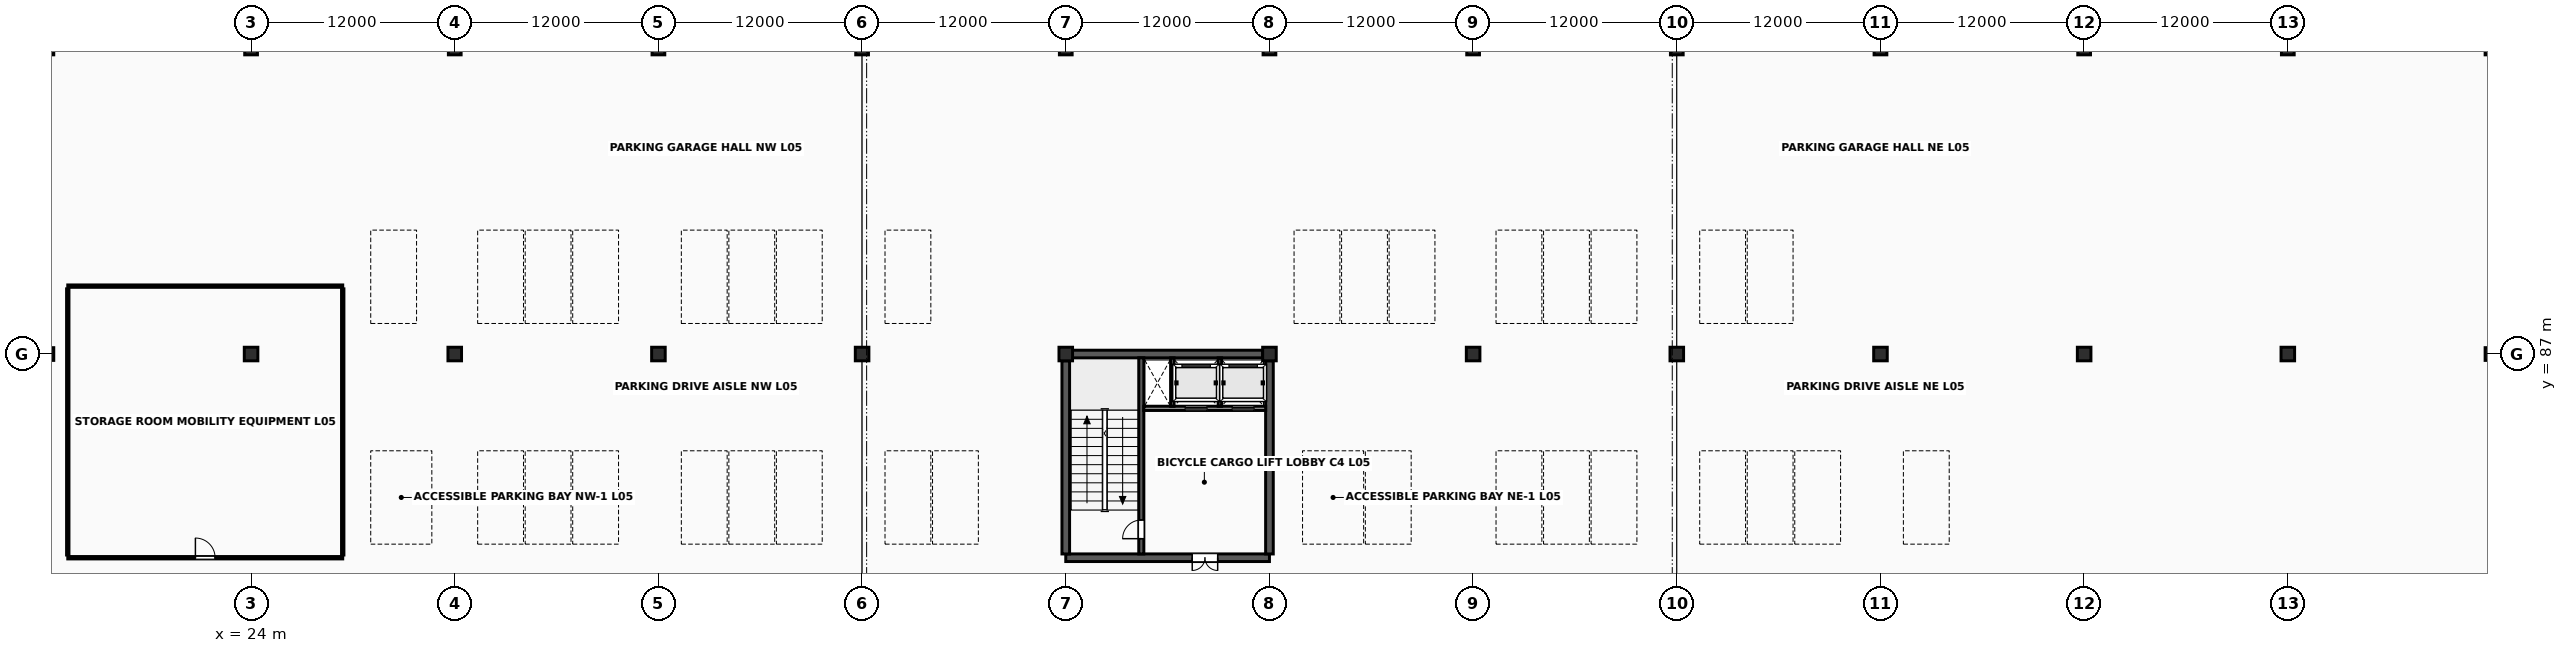
"""IFC4 building model, lengths in metres.
Left out: names, types, materials, properties, quantities, classifications, styles, units other than length and angle.
Written with IfcOpenShell. Run it as: python <this file> out.ifc"""

import sys

from ifc_helpers import new_model, si_unit, direction, frame, frame_2d, origin, origin_2d, place, context, subcontext, project, spatial, rectangle, extrude, element, fill, save


model = new_model("IFC4")
c1 = context("Model", 3, precision=1e-05, world=origin(), true_north=direction((0.0, 1.0)))
c2 = subcontext(c1, "Body", "Model", "MODEL_VIEW")
j1 = project(units=[si_unit("LENGTHUNIT", "METRE"), si_unit("PLANEANGLEUNIT", "RADIAN")], contexts=[c1])
p1 = place(None, origin())
s1 = spatial("IfcSite", under=j1, at=p1, CompositionType="ELEMENT")
p2 = place(p1, origin())
s2 = spatial("IfcBuilding", under=s1, at=p2, CompositionType="ELEMENT")
p3 = place(p2, frame((0.0, 0.0, 21.0)))
s3 = spatial("IfcBuildingStorey", under=s2, at=p3, CompositionType="ELEMENT", Elevation=21.0)
for number, where, z_axis, x_axis in (
    (1, (12.0, 87.0, 0.0), (0.0, 0.0, 1.0), (1.0, 0.0, 0.0)),
    (2, (12.0, 105.0, 0.0), (0.0, 0.0, 1.0), (1.0, 0.0, 0.0)),
):
    element("IfcColumn", number, at=place(p3, frame(where, z_axis=z_axis, x_axis=x_axis)), inside=s3, PredefinedType="COLUMN", context=c2, shape_type="SweptSolid", body=[
        extrude(rectangle(XDim=0.75, YDim=0.75, at=origin_2d()), origin(), (0.0, 0.0, 1.0), 3.8),
    ])
p4 = place(p3, frame((24.0, 87.0, 0.0), z_axis=(0.0, 0.0, 1.0), x_axis=(1.0, 0.0, 0.0)))
e3 = element("IfcColumn", 3, at=p4, inside=s3, PredefinedType="COLUMN", context=c2, shape_type="SweptSolid", body=[
    extrude(rectangle(XDim=0.8, YDim=0.8, at=origin_2d()), origin(), (0.0, 0.0, 1.0), 3.8),
])
p5 = place(p3, frame((24.0, 105.0, 0.0), z_axis=(0.0, 0.0, 1.0), x_axis=(1.0, 0.0, 0.0)))
e4 = element("IfcColumn", 4, at=p5, inside=s3, PredefinedType="COLUMN", context=c2, shape_type="SweptSolid", body=[
    extrude(rectangle(XDim=0.75, YDim=0.75, at=origin_2d()), origin(), (0.0, 0.0, 1.0), 3.8),
])
p6 = place(p3, frame((36.0, 87.0, 0.0), z_axis=(0.0, 0.0, 1.0), x_axis=(1.0, 0.0, 0.0)))
e5 = element("IfcColumn", 5, at=p6, inside=s3, PredefinedType="COLUMN", context=c2, shape_type="SweptSolid", body=[
    extrude(rectangle(XDim=0.8, YDim=0.8, at=origin_2d()), origin(), (0.0, 0.0, 1.0), 3.8),
])
p7 = place(p3, frame((36.0, 105.0, 0.0), z_axis=(0.0, 0.0, 1.0), x_axis=(1.0, 0.0, 0.0)))
e6 = element("IfcColumn", 6, at=p7, inside=s3, PredefinedType="COLUMN", context=c2, shape_type="SweptSolid", body=[
    extrude(rectangle(XDim=0.75, YDim=0.75, at=origin_2d()), origin(), (0.0, 0.0, 1.0), 3.8),
])
p8 = place(p3, frame((48.0, 87.0, 0.0), z_axis=(0.0, 0.0, 1.0), x_axis=(1.0, 0.0, 0.0)))
e7 = element("IfcColumn", 7, at=p8, inside=s3, PredefinedType="COLUMN", context=c2, shape_type="SweptSolid", body=[
    extrude(rectangle(XDim=0.8, YDim=0.8, at=origin_2d()), origin(), (0.0, 0.0, 1.0), 3.8),
])
p9 = place(p3, frame((48.0, 105.0, 0.0), z_axis=(0.0, 0.0, 1.0), x_axis=(1.0, 0.0, 0.0)))
e8 = element("IfcColumn", 8, at=p9, inside=s3, PredefinedType="COLUMN", context=c2, shape_type="SweptSolid", body=[
    extrude(rectangle(XDim=0.75, YDim=0.75, at=origin_2d()), origin(), (0.0, 0.0, 1.0), 3.8),
])
p10 = place(p3, frame((60.0, 87.0, 0.0), z_axis=(0.0, 0.0, 1.0), x_axis=(1.0, 0.0, 0.0)))
e9 = element("IfcColumn", 9, at=p10, inside=s3, PredefinedType="COLUMN", context=c2, shape_type="SweptSolid", body=[
    extrude(rectangle(XDim=0.8, YDim=0.8, at=origin_2d()), origin(), (0.0, 0.0, 1.0), 3.8),
])
p11 = place(p3, frame((60.0, 105.0, 0.0), z_axis=(0.0, 0.0, 1.0), x_axis=(1.0, 0.0, 0.0)))
e10 = element("IfcColumn", 10, at=p11, inside=s3, PredefinedType="COLUMN", context=c2, shape_type="SweptSolid", body=[
    extrude(rectangle(XDim=0.75, YDim=0.75, at=origin_2d()), origin(), (0.0, 0.0, 1.0), 3.8),
])
p12 = place(p3, frame((72.0, 87.0, 0.0), z_axis=(0.0, 0.0, 1.0), x_axis=(1.0, 0.0, 0.0)))
e11 = element("IfcColumn", 11, at=p12, inside=s3, PredefinedType="COLUMN", context=c2, shape_type="SweptSolid", body=[
    extrude(rectangle(XDim=0.8, YDim=0.8, at=origin_2d()), origin(), (0.0, 0.0, 1.0), 3.8),
])
p13 = place(p3, frame((72.0, 105.0, 0.0), z_axis=(0.0, 0.0, 1.0), x_axis=(1.0, 0.0, 0.0)))
e12 = element("IfcColumn", 12, at=p13, inside=s3, PredefinedType="COLUMN", context=c2, shape_type="SweptSolid", body=[
    extrude(rectangle(XDim=0.75, YDim=0.75, at=origin_2d()), origin(), (0.0, 0.0, 1.0), 3.8),
])
p14 = place(p3, frame((84.0, 87.0, 0.0), z_axis=(0.0, 0.0, 1.0), x_axis=(1.0, 0.0, 0.0)))
e13 = element("IfcColumn", 13, at=p14, inside=s3, PredefinedType="COLUMN", context=c2, shape_type="SweptSolid", body=[
    extrude(rectangle(XDim=0.8, YDim=0.8, at=origin_2d()), origin(), (0.0, 0.0, 1.0), 3.8),
])
p15 = place(p3, frame((84.0, 105.0, 0.0), z_axis=(0.0, 0.0, 1.0), x_axis=(1.0, 0.0, 0.0)))
e14 = element("IfcColumn", 14, at=p15, inside=s3, PredefinedType="COLUMN", context=c2, shape_type="SweptSolid", body=[
    extrude(rectangle(XDim=0.75, YDim=0.75, at=origin_2d()), origin(), (0.0, 0.0, 1.0), 3.8),
])
p16 = place(p3, frame((96.0, 87.0, 0.0), z_axis=(0.0, 0.0, 1.0), x_axis=(1.0, 0.0, 0.0)))
e15 = element("IfcColumn", 15, at=p16, inside=s3, PredefinedType="COLUMN", context=c2, shape_type="SweptSolid", body=[
    extrude(rectangle(XDim=0.8, YDim=0.8, at=origin_2d()), origin(), (0.0, 0.0, 1.0), 3.8),
])
p17 = place(p3, frame((96.0, 105.0, 0.0), z_axis=(0.0, 0.0, 1.0), x_axis=(1.0, 0.0, 0.0)))
e16 = element("IfcColumn", 16, at=p17, inside=s3, PredefinedType="COLUMN", context=c2, shape_type="SweptSolid", body=[
    extrude(rectangle(XDim=0.75, YDim=0.75, at=origin_2d()), origin(), (0.0, 0.0, 1.0), 3.8),
])
p18 = place(p3, frame((108.0, 87.0, 0.0), z_axis=(0.0, 0.0, 1.0), x_axis=(1.0, 0.0, 0.0)))
e17 = element("IfcColumn", 17, at=p18, inside=s3, PredefinedType="COLUMN", context=c2, shape_type="SweptSolid", body=[
    extrude(rectangle(XDim=0.8, YDim=0.8, at=origin_2d()), origin(), (0.0, 0.0, 1.0), 3.8),
])
p19 = place(p3, frame((108.0, 105.0, 0.0), z_axis=(0.0, 0.0, 1.0), x_axis=(1.0, 0.0, 0.0)))
e18 = element("IfcColumn", 18, at=p19, inside=s3, PredefinedType="COLUMN", context=c2, shape_type="SweptSolid", body=[
    extrude(rectangle(XDim=0.75, YDim=0.75, at=origin_2d()), origin(), (0.0, 0.0, 1.0), 3.8),
])
p20 = place(p3, frame((120.0, 87.0, 0.0), z_axis=(0.0, 0.0, 1.0), x_axis=(1.0, 0.0, 0.0)))
e19 = element("IfcColumn", 19, at=p20, inside=s3, PredefinedType="COLUMN", context=c2, shape_type="SweptSolid", body=[
    extrude(rectangle(XDim=0.8, YDim=0.8, at=origin_2d()), origin(), (0.0, 0.0, 1.0), 3.8),
])
p21 = place(p3, frame((120.0, 105.0, 0.0), z_axis=(0.0, 0.0, 1.0), x_axis=(1.0, 0.0, 0.0)))
e20 = element("IfcColumn", 20, at=p21, inside=s3, PredefinedType="COLUMN", context=c2, shape_type="SweptSolid", body=[
    extrude(rectangle(XDim=0.75, YDim=0.75, at=origin_2d()), origin(), (0.0, 0.0, 1.0), 3.8),
])
p22 = place(p3, frame((132.0, 87.0, 0.0), z_axis=(0.0, 0.0, 1.0), x_axis=(1.0, 0.0, 0.0)))
e21 = element("IfcColumn", 21, at=p22, inside=s3, PredefinedType="COLUMN", context=c2, shape_type="SweptSolid", body=[
    extrude(rectangle(XDim=0.8, YDim=0.8, at=origin_2d()), origin(), (0.0, 0.0, 1.0), 3.8),
])
p23 = place(p3, frame((132.0, 105.0, 0.0), z_axis=(0.0, 0.0, 1.0), x_axis=(1.0, 0.0, 0.0)))
e22 = element("IfcColumn", 22, at=p23, inside=s3, PredefinedType="COLUMN", context=c2, shape_type="SweptSolid", body=[
    extrude(rectangle(XDim=0.75, YDim=0.75, at=origin_2d()), origin(), (0.0, 0.0, 1.0), 3.8),
])
p24 = place(p3, frame((144.0, 87.0, 0.0), z_axis=(0.0, 0.0, 1.0), x_axis=(1.0, 0.0, 0.0)))
e23 = element("IfcColumn", 23, at=p24, inside=s3, PredefinedType="COLUMN", context=c2, shape_type="SweptSolid", body=[
    extrude(rectangle(XDim=0.8, YDim=0.8, at=origin_2d()), origin(), (0.0, 0.0, 1.0), 3.8),
])
for number, where, z_axis, x_axis in (
    (24, (144.0, 105.0, 0.0), (0.0, 0.0, 1.0), (1.0, 0.0, 0.0)),
    (25, (156.0, 87.0, 0.0), (0.0, 0.0, 1.0), (1.0, 0.0, 0.0)),
    (26, (156.0, 105.0, 0.0), (0.0, 0.0, 1.0), (1.0, 0.0, 0.0)),
):
    element("IfcColumn", number, at=place(p3, frame(where, z_axis=z_axis, x_axis=x_axis)), inside=s3, PredefinedType="COLUMN", context=c2, shape_type="SweptSolid", body=[
        extrude(rectangle(XDim=0.75, YDim=0.75, at=origin_2d()), origin(), (0.0, 0.0, 1.0), 3.8),
    ])
p25 = place(p3, frame((72.0, 75.0, 0.0), z_axis=(0.0, 0.0, 1.0), x_axis=(1.0, 0.0, 0.0)))
e27 = element("IfcWall", 27, at=p25, inside=s3, PredefinedType="SHEAR", context=c2, shape_type="SweptSolid", body=[
    extrude(rectangle(XDim=12.0, YDim=0.45, at=frame_2d((6.0, 0.0))), origin(), (0.0, 0.0, 1.0), 3.638),
])
p26 = place(p25, frame((7.45, 0.0, 0.0)))
e28 = element("IfcOpeningElement", 28, at=p26, cuts=e27, PredefinedType="OPENING", context=c2, shape_type="SweptSolid", body=[
    extrude(rectangle(XDim=1.5, YDim=2.25, at=frame_2d((0.75, 1.125))), frame((0.0, 0.24, 0.0), z_axis=(0.0, -1.0, 0.0), x_axis=(1.0, 0.0, 0.0)), (0.0, 0.0, 1.0), 0.48),
])
p27 = place(p3, frame((72.397, 87.0, 0.0), z_axis=(0.0, 0.0, 1.0), x_axis=(1.0, 0.0, 0.0)))
e29 = element("IfcWall", 29, at=p27, inside=s3, PredefinedType="SHEAR", context=c2, shape_type="SweptSolid", body=[
    extrude(rectangle(XDim=11.206, YDim=0.45, at=frame_2d((5.603, 0.0))), origin(), (0.0, 0.0, 1.0), 3.638),
])
for number, where, z_axis, x_axis in (
    (30, (72.0, 75.222, 0.0), (0.0, 0.0, 1.0), (0.0, 1.0, 0.0)),
    (31, (84.0, 75.222, 0.0), (0.0, 0.0, 1.0), (0.0, 1.0, 0.0)),
):
    element("IfcWall", number, at=place(p3, frame(where, z_axis=z_axis, x_axis=x_axis)), inside=s3, PredefinedType="SHEAR", context=c2, shape_type="SweptSolid", body=[
        extrude(rectangle(XDim=11.381, YDim=0.45, at=frame_2d((5.69, 0.0))), origin(), (0.0, 0.0, 1.0), 3.638),
    ])
p28 = place(p3, frame((76.45, 75.222, 0.0), z_axis=(0.0, 0.0, 1.0), x_axis=(0.0, 1.0, 0.0)))
e32 = element("IfcWall", 32, at=p28, inside=s3, PredefinedType="SHEAR", context=c2, shape_type="SweptSolid", body=[
    extrude(rectangle(XDim=11.556, YDim=0.3, at=frame_2d((5.778, 0.0))), origin(), (0.0, 0.0, 1.0), 3.638),
])
p29 = place(p28, frame((0.9, 0.0, 0.0)))
e33 = element("IfcOpeningElement", 33, at=p29, cuts=e32, PredefinedType="OPENING", context=c2, shape_type="SweptSolid", body=[
    extrude(rectangle(XDim=1.1, YDim=2.2, at=frame_2d((0.55, 1.1))), frame((0.0, 0.165, 0.0), z_axis=(0.0, -1.0, 0.0), x_axis=(1.0, 0.0, 0.0)), (0.0, 0.0, 1.0), 0.33),
])
p30 = place(p3, frame((76.597, 83.8, 0.0), z_axis=(0.0, 0.0, 1.0), x_axis=(1.0, 0.0, 0.0)))
e34 = element("IfcWall", 34, at=p30, inside=s3, PredefinedType="SOLIDWALL", context=c2, shape_type="SweptSolid", body=[
    extrude(rectangle(XDim=7.181, YDim=0.25, at=frame_2d((3.591, 0.0))), origin(), (0.0, 0.0, 1.0), 3.638),
])
p31 = place(p30, frame((2.433, 0.0, 0.0)))
e35 = element("IfcOpeningElement", 35, at=p31, cuts=e34, PredefinedType="OPENING", context=c2, shape_type="SweptSolid", body=[
    extrude(rectangle(XDim=1.3, YDim=2.28, at=frame_2d((0.65, 1.14))), frame((0.0, 0.14, 0.0), z_axis=(0.0, -1.0, 0.0), x_axis=(1.0, 0.0, 0.0)), (0.0, 0.0, 1.0), 0.28),
])
p32 = place(p30, frame((5.203, 0.0, 0.0)))
e36 = element("IfcOpeningElement", 36, at=p32, cuts=e34, PredefinedType="OPENING", context=c2, shape_type="SweptSolid", body=[
    extrude(rectangle(XDim=1.3, YDim=2.28, at=frame_2d((0.65, 1.14))), frame((0.0, 0.14, 0.0), z_axis=(0.0, -1.0, 0.0), x_axis=(1.0, 0.0, 0.0)), (0.0, 0.0, 1.0), 0.28),
])
for number, where, z_axis, x_axis in (
    (37, (78.28, 83.92, 0.0), (0.0, 0.0, 1.0), (0.0, 1.0, 0.0)),
    (38, (81.08, 83.92, 0.0), (0.0, 0.0, 1.0), (0.0, 1.0, 0.0)),
):
    element("IfcWall", number, at=place(p3, frame(where, z_axis=z_axis, x_axis=x_axis)), inside=s3, PredefinedType="SOLIDWALL", context=c2, shape_type="SweptSolid", body=[
        extrude(rectangle(XDim=2.855, YDim=0.2, at=frame_2d((1.427, 0.0))), origin(), (0.0, 0.0, 1.0), 3.628),
    ])
p33 = place(p3, frame((13.2, 75.0, 0.0), z_axis=(0.0, 0.0, 1.0), x_axis=(1.0, 0.0, 0.0)))
e39 = element("IfcWall", 39, at=p33, inside=s3, PredefinedType="PARTITIONING", context=c2, shape_type="SweptSolid", body=[
    extrude(rectangle(XDim=16.2, YDim=0.14, at=frame_2d((8.1, 0.0))), origin(), (0.0, 0.0, 1.0), 2.75),
])
p34 = place(p33, frame((7.52, 0.0, 0.0)))
e40 = element("IfcOpeningElement", 40, at=p34, cuts=e39, PredefinedType="OPENING", context=c2, shape_type="SweptSolid", body=[
    extrude(rectangle(XDim=1.16, YDim=2.23, at=frame_2d((0.58, 1.115))), frame((0.0, 0.085, 0.0), z_axis=(0.0, -1.0, 0.0), x_axis=(1.0, 0.0, 0.0)), (0.0, 0.0, 1.0), 0.17),
])
p35 = place(p3, frame((13.2, 91.0, 0.0), z_axis=(0.0, 0.0, 1.0), x_axis=(1.0, 0.0, 0.0)))
e41 = element("IfcWall", 41, at=p35, inside=s3, PredefinedType="PARTITIONING", context=c2, shape_type="SweptSolid", body=[
    extrude(rectangle(XDim=16.2, YDim=0.14, at=frame_2d((8.1, 0.0))), origin(), (0.0, 0.0, 1.0), 2.75),
])
for number, where, z_axis, x_axis in (
    (42, (13.2, 75.16, 0.0), (0.0, 0.0, 1.0), (0.0, 1.0, 0.0)),
    (43, (29.4, 75.16, 0.0), (0.0, 0.0, 1.0), (0.0, 1.0, 0.0)),
):
    element("IfcWall", number, at=place(p3, frame(where, z_axis=z_axis, x_axis=x_axis)), inside=s3, PredefinedType="PARTITIONING", context=c2, shape_type="SweptSolid", body=[
        extrude(rectangle(XDim=15.68, YDim=0.14, at=frame_2d((7.84, 0.0))), origin(), (0.0, 0.0, 1.0), 2.75),
    ])
p36 = place(p29, origin())
e44 = element("IfcDoor", 44, at=p36, inside=s3, OperationType="SINGLE_SWING_LEFT", PredefinedType="DOOR", context=c2, shape_type="SweptSolid", body=[
    extrude(rectangle(XDim=1.1, YDim=2.2, at=frame_2d((0.55, 1.1))), frame((0.0, 0.025, 0.0), z_axis=(0.0, -1.0, 0.0), x_axis=(1.0, 0.0, 0.0)), (0.0, 0.0, 1.0), 0.05),
])
fill(e33, e44)
p37 = place(p26, origin())
e45 = element("IfcDoor", 45, at=p37, inside=s3, OperationType="DOUBLE_DOOR_SINGLE_SWING", PredefinedType="DOOR", context=c2, shape_type="SweptSolid", body=[
    extrude(rectangle(XDim=1.5, YDim=2.25, at=frame_2d((0.75, 1.125))), frame((0.0, 0.025, 0.0), z_axis=(0.0, -1.0, 0.0), x_axis=(1.0, 0.0, 0.0)), (0.0, 0.0, 1.0), 0.05),
])
fill(e28, e45)
p38 = place(p31, origin())
e46 = element("IfcDoor", 46, at=p38, inside=s3, OperationType="SLIDING_TO_LEFT", PredefinedType="USERDEFINED", context=c2, shape_type="SweptSolid", body=[
    extrude(rectangle(XDim=1.3, YDim=2.28, at=frame_2d((0.65, 1.14))), frame((0.0, 0.025, 0.0), z_axis=(0.0, -1.0, 0.0), x_axis=(1.0, 0.0, 0.0)), (0.0, 0.0, 1.0), 0.05),
])
fill(e35, e46)
p39 = place(p32, origin())
e47 = element("IfcDoor", 47, at=p39, inside=s3, OperationType="SLIDING_TO_LEFT", PredefinedType="USERDEFINED", context=c2, shape_type="SweptSolid", body=[
    extrude(rectangle(XDim=1.3, YDim=2.28, at=frame_2d((0.65, 1.14))), frame((0.0, 0.025, 0.0), z_axis=(0.0, -1.0, 0.0), x_axis=(1.0, 0.0, 0.0)), (0.0, 0.0, 1.0), 0.05),
])
fill(e36, e47)
p40 = place(p34, origin())
e48 = element("IfcDoor", 48, at=p40, inside=s3, OperationType="SINGLE_SWING_LEFT", PredefinedType="DOOR", context=c2, shape_type="SweptSolid", body=[
    extrude(rectangle(XDim=1.16, YDim=2.23, at=frame_2d((0.58, 1.115))), frame((0.0, 0.025, 0.0), z_axis=(0.0, -1.0, 0.0), x_axis=(1.0, 0.0, 0.0)), (0.0, 0.0, 1.0), 0.05),
])
fill(e40, e48)
save(model, sys.argv[1])
